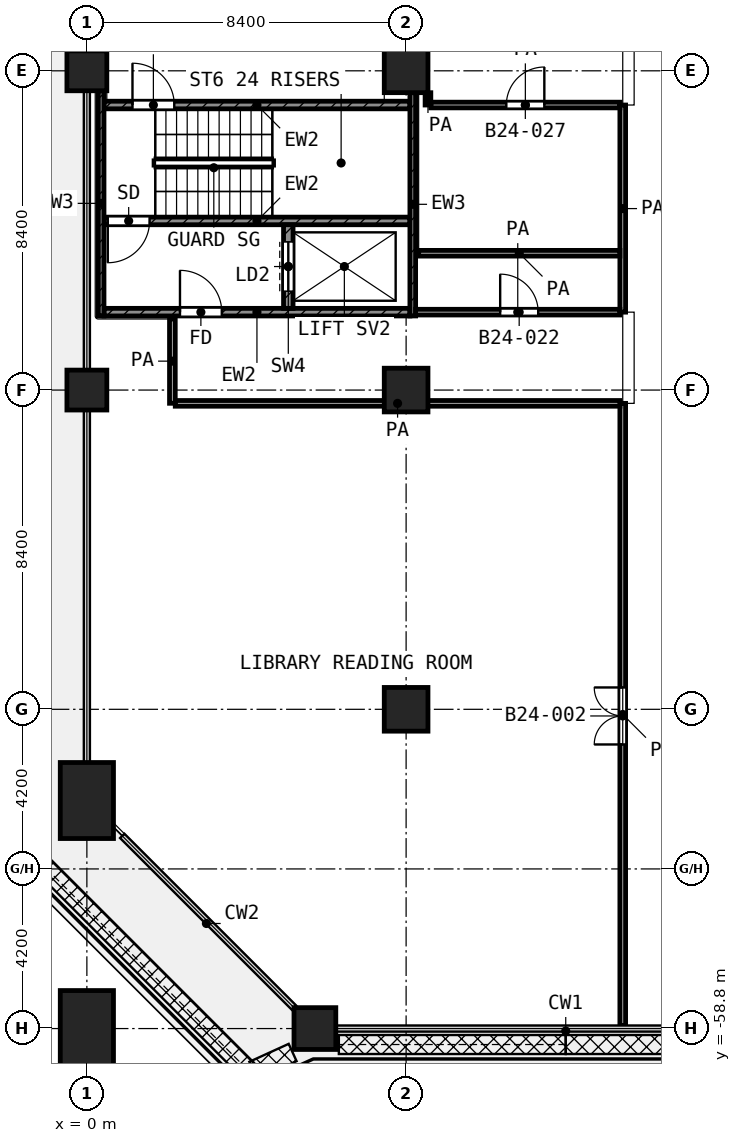
"""IFC4 building model, lengths in metres.
Left out: names, types, materials, properties, quantities, classifications, styles, units other than length and angle.
Written with IfcOpenShell. Run it as: python <this file> out.ifc"""

import sys

from ifc_helpers import new_model, si_unit, direction, frame, frame_2d, origin, origin_2d, place, context, subcontext, project, spatial, rectangle, extrude, element, fill, save


model = new_model("IFC4")
c1 = context("Model", 3, precision=1e-05, world=origin(), true_north=direction((0.0, 1.0)))
c2 = subcontext(c1, "Body", "Model", "MODEL_VIEW")
j1 = project(units=[si_unit("LENGTHUNIT", "METRE"), si_unit("PLANEANGLEUNIT", "RADIAN")], contexts=[c1])
p1 = place(None, origin())
s1 = spatial("IfcSite", under=j1, at=p1, CompositionType="ELEMENT")
p2 = place(p1, origin())
s2 = spatial("IfcBuilding", under=s1, at=p2, CompositionType="ELEMENT")
p3 = place(p2, frame((0.0, 0.0, 107.2)))
s3 = spatial("IfcBuildingStorey", under=s2, at=p3, CompositionType="ELEMENT", Elevation=107.2)
p4 = place(p3, frame((0.0, -33.6, 0.0), z_axis=(0.0, 0.0, 1.0), x_axis=(1.0, 0.0, 0.0)))
e1 = element("IfcColumn", 1, at=p4, inside=s3, PredefinedType="COLUMN", context=c2, shape_type="SweptSolid", body=[
    extrude(rectangle(XDim=1.05, YDim=1.05, at=origin_2d()), origin(), (0.0, 0.0, 1.0), 4.2),
])
p5 = place(p3, frame((8.4, -33.6, 0.0), z_axis=(0.0, 0.0, 1.0), x_axis=(1.0, 0.0, 0.0)))
e2 = element("IfcColumn", 2, at=p5, inside=s3, PredefinedType="COLUMN", context=c2, shape_type="SweptSolid", body=[
    extrude(rectangle(XDim=1.15, YDim=1.15, at=origin_2d()), origin(), (0.0, 0.0, 1.0), 4.2),
])
p6 = place(p3, frame((0.0, -42.0, 0.0), z_axis=(0.0, 0.0, 1.0), x_axis=(1.0, 0.0, 0.0)))
e3 = element("IfcColumn", 3, at=p6, inside=s3, PredefinedType="COLUMN", context=c2, shape_type="SweptSolid", body=[
    extrude(rectangle(XDim=1.05, YDim=1.05, at=origin_2d()), origin(), (0.0, 0.0, 1.0), 4.2),
])
for number, where, z_axis, x_axis in (
    (4, (8.4, -42.0, 0.0), (0.0, 0.0, 1.0), (1.0, 0.0, 0.0)),
    (5, (8.4, -50.4, 0.0), (0.0, 0.0, 1.0), (1.0, 0.0, 0.0)),
):
    element("IfcColumn", number, at=place(p3, frame(where, z_axis=z_axis, x_axis=x_axis)), inside=s3, PredefinedType="COLUMN", context=c2, shape_type="SweptSolid", body=[
        extrude(rectangle(XDim=1.15, YDim=1.15, at=origin_2d()), origin(), (0.0, 0.0, 1.0), 4.2),
    ])
p7 = place(p3, frame((0.0, -52.8, 0.0), z_axis=(0.0, 0.0, 1.0), x_axis=(0.0, 1.0, 0.0)))
e6 = element("IfcColumn", 6, at=p7, inside=s3, PredefinedType="COLUMN", context=c2, shape_type="SweptSolid", body=[
    extrude(rectangle(XDim=2.0, YDim=1.4, at=origin_2d()), origin(), (0.0, 0.0, 1.0), 4.2),
])
p8 = place(p3, frame((6.0, -58.8, 0.0), z_axis=(0.0, 0.0, 1.0), x_axis=(1.0, 0.0, 0.0)))
e7 = element("IfcColumn", 7, at=p8, inside=s3, PredefinedType="COLUMN", context=c2, shape_type="SweptSolid", body=[
    extrude(rectangle(XDim=1.1, YDim=1.1, at=origin_2d()), origin(), (0.0, 0.0, 1.0), 4.2),
])
p9 = place(p3, frame((0.0, -58.8, 0.0), z_axis=(0.0, 0.0, 1.0), x_axis=(0.0, 1.0, 0.0)))
e8 = element("IfcColumn", 8, at=p9, inside=s3, PredefinedType="COLUMN", context=c2, shape_type="SweptSolid", body=[
    extrude(rectangle(XDim=2.0, YDim=1.4, at=origin_2d()), origin(), (0.0, 0.0, 1.0), 4.2),
])
p10 = place(p3, frame((0.375, -40.05, 0.0), z_axis=(0.0, 0.0, 1.0), x_axis=(0.0, 1.0, 0.0)))
e9 = element("IfcWall", 9, at=p10, inside=s3, PredefinedType="SHEAR", context=c2, shape_type="SweptSolid", body=[
    extrude(rectangle(XDim=5.925, YDim=0.15, at=frame_2d((2.962, 0.0))), origin(), (0.0, 0.0, 1.0), 3.6),
])
p11 = place(p3, frame((8.575, -40.05, 0.0), z_axis=(0.0, 0.0, 1.0), x_axis=(0.0, 1.0, 0.0)))
e10 = element("IfcWall", 10, at=p11, inside=s3, PredefinedType="SHEAR", context=c2, shape_type="SweptSolid", body=[
    extrude(rectangle(XDim=5.875, YDim=0.15, at=frame_2d((2.938, 0.0))), origin(), (0.0, 0.0, 1.0), 3.6),
])
p12 = place(p3, frame((0.45, -34.5, 0.0), z_axis=(0.0, 0.0, 1.0), x_axis=(1.0, 0.0, 0.0)))
e11 = element("IfcWall", 11, at=p12, inside=s3, PredefinedType="SHEAR", context=c2, shape_type="SweptSolid", body=[
    extrude(rectangle(XDim=8.05, YDim=0.2, at=frame_2d((4.025, 0.0))), origin(), (0.0, 0.0, 1.0), 3.6),
])
p13 = place(p12, frame((0.75, 0.0, 0.0)))
e12 = element("IfcOpeningElement", 12, at=p13, cuts=e11, PredefinedType="OPENING", context=c2, shape_type="SweptSolid", body=[
    extrude(rectangle(XDim=1.1, YDim=2.1, at=frame_2d((0.55, 1.05))), frame((0.0, 0.11, 0.0), z_axis=(0.0, -1.0, 0.0), x_axis=(1.0, 0.0, 0.0)), (0.0, 0.0, 1.0), 0.22),
])
p14 = place(p3, frame((0.45, -37.55, 0.0), z_axis=(0.0, 0.0, 1.0), x_axis=(1.0, 0.0, 0.0)))
e13 = element("IfcWall", 13, at=p14, inside=s3, PredefinedType="SHEAR", context=c2, shape_type="SweptSolid", body=[
    extrude(rectangle(XDim=8.05, YDim=0.2, at=frame_2d((4.025, 0.0))), origin(), (0.0, 0.0, 1.0), 3.6),
])
p15 = place(p14, frame((0.1, 0.0, 0.0)))
e14 = element("IfcOpeningElement", 14, at=p15, cuts=e13, PredefinedType="OPENING", context=c2, shape_type="SweptSolid", body=[
    extrude(rectangle(XDim=1.1, YDim=2.1, at=frame_2d((0.55, 1.05))), frame((0.0, 0.11, 0.0), z_axis=(0.0, -1.0, 0.0), x_axis=(1.0, 0.0, 0.0)), (0.0, 0.0, 1.0), 0.22),
])
p16 = place(p3, frame((0.45, -39.95, 0.0), z_axis=(0.0, 0.0, 1.0), x_axis=(1.0, 0.0, 0.0)))
e15 = element("IfcWall", 15, at=p16, inside=s3, PredefinedType="SHEAR", context=c2, shape_type="SweptSolid", body=[
    extrude(rectangle(XDim=8.05, YDim=0.2, at=frame_2d((4.025, 0.0))), origin(), (0.0, 0.0, 1.0), 3.6),
])
p17 = place(p16, frame((2.0, 0.0, 0.0)))
e16 = element("IfcOpeningElement", 16, at=p17, cuts=e15, PredefinedType="OPENING", context=c2, shape_type="SweptSolid", body=[
    extrude(rectangle(XDim=1.1, YDim=2.1, at=frame_2d((0.55, 1.05))), frame((0.0, 0.11, 0.0), z_axis=(0.0, -1.0, 0.0), x_axis=(1.0, 0.0, 0.0)), (0.0, 0.0, 1.0), 0.22),
])
p18 = place(p3, frame((5.3, -39.85, 0.0), z_axis=(0.0, 0.0, 1.0), x_axis=(0.0, 1.0, 0.0)))
e17 = element("IfcWall", 17, at=p18, inside=s3, PredefinedType="SHEAR", context=c2, shape_type="SweptSolid", body=[
    extrude(rectangle(XDim=2.2, YDim=0.25, at=frame_2d((1.1, 0.0))), origin(), (0.0, 0.0, 1.0), 3.6),
])
p19 = place(p18, frame((0.45, 0.0, 0.0)))
e18 = element("IfcOpeningElement", 18, at=p19, cuts=e17, PredefinedType="OPENING", context=c2, shape_type="SweptSolid", body=[
    extrude(rectangle(XDim=1.3, YDim=2.1, at=frame_2d((0.65, 1.05))), frame((0.0, 0.135, 0.0), z_axis=(0.0, -1.0, 0.0), x_axis=(1.0, 0.0, 0.0)), (0.0, 0.0, 1.0), 0.27),
])
p20 = place(p3, frame((2.326, -42.35, 0.0), z_axis=(0.0, 0.0, 1.0), x_axis=(1.0, 0.0, 0.0)))
e19 = element("IfcWall", 19, at=p20, inside=s3, PredefinedType="PARTITIONING", context=c2, shape_type="SweptSolid", body=[
    extrude(rectangle(XDim=11.699, YDim=0.15, at=frame_2d((5.85, 0.0))), origin(), (0.0, 0.0, 1.0), 3.6),
])
p21 = place(p3, frame((8.65, -39.95, 0.0), z_axis=(0.0, 0.0, 1.0), x_axis=(1.0, 0.0, 0.0)))
e20 = element("IfcWall", 20, at=p21, inside=s3, PredefinedType="PARTITIONING", context=c2, shape_type="SweptSolid", body=[
    extrude(rectangle(XDim=5.375, YDim=0.15, at=frame_2d((2.688, 0.0))), origin(), (0.0, 0.0, 1.0), 3.6),
])
p22 = place(p21, frame((2.225, 0.0, 0.0)))
e21 = element("IfcOpeningElement", 21, at=p22, cuts=e20, PredefinedType="OPENING", context=c2, shape_type="SweptSolid", body=[
    extrude(rectangle(XDim=1.0, YDim=2.1, at=frame_2d((0.5, 1.05))), frame((0.0, 0.085, 0.0), z_axis=(0.0, -1.0, 0.0), x_axis=(1.0, 0.0, 0.0)), (0.0, 0.0, 1.0), 0.17),
])
p23 = place(p3, frame((8.73, -38.4, 0.0), z_axis=(0.0, 0.0, 1.0), x_axis=(1.0, 0.0, 0.0)))
e22 = element("IfcWall", 22, at=p23, inside=s3, PredefinedType="PARTITIONING", context=c2, shape_type="SweptSolid", body=[
    extrude(rectangle(XDim=5.295, YDim=0.15, at=frame_2d((2.647, 0.0))), origin(), (0.0, 0.0, 1.0), 3.6),
])
p24 = place(p3, frame((9.05, -34.5, 0.0), z_axis=(0.0, 0.0, 1.0), x_axis=(1.0, 0.0, 0.0)))
e23 = element("IfcWall", 23, at=p24, inside=s3, PredefinedType="PARTITIONING", context=c2, shape_type="SweptSolid", body=[
    extrude(rectangle(XDim=4.975, YDim=0.15, at=frame_2d((2.487, 0.0))), origin(), (0.0, 0.0, 1.0), 3.6),
])
p25 = place(p24, frame((1.987, 0.0, 0.0)))
e24 = element("IfcOpeningElement", 24, at=p25, cuts=e23, PredefinedType="OPENING", context=c2, shape_type="SweptSolid", body=[
    extrude(rectangle(XDim=1.0, YDim=2.1, at=frame_2d((0.5, 1.05))), frame((0.0, 0.085, 0.0), z_axis=(0.0, -1.0, 0.0), x_axis=(1.0, 0.0, 0.0)), (0.0, 0.0, 1.0), 0.17),
])
p26 = place(p3, frame((2.25, -42.348, 0.0), z_axis=(0.0, 0.0, 1.0), x_axis=(0.0, 1.0, 0.0)))
e25 = element("IfcWall", 25, at=p26, inside=s3, PredefinedType="PARTITIONING", context=c2, shape_type="SweptSolid", body=[
    extrude(rectangle(XDim=2.218, YDim=0.15, at=frame_2d((1.109, 0.0))), origin(), (0.0, 0.0, 1.0), 3.6),
])
p27 = place(p3, frame((8.975, -34.5, 0.0), z_axis=(0.0, 0.0, 1.0), x_axis=(0.0, 1.0, 0.0)))
e26 = element("IfcWall", 26, at=p27, inside=s3, PredefinedType="PARTITIONING", context=c2, shape_type="SweptSolid", body=[
    extrude(rectangle(XDim=0.324, YDim=0.15, at=frame_2d((0.162, 0.0))), origin(), (0.0, 0.0, 1.0), 3.6),
])
p28 = place(p3, frame((14.1, -58.72, 0.0), z_axis=(0.0, 0.0, 1.0), x_axis=(0.0, 1.0, 0.0)))
e27 = element("IfcWall", 27, at=p28, inside=s3, PredefinedType="PARTITIONING", context=c2, shape_type="SweptSolid", body=[
    extrude(rectangle(XDim=16.37, YDim=0.15, at=frame_2d((8.185, 0.0))), origin(), (0.0, 0.0, 1.0), 2.7),
])
p29 = place(p28, frame((7.395, 0.0, 0.0)))
e28 = element("IfcOpeningElement", 28, at=p29, cuts=e27, PredefinedType="OPENING", context=c2, shape_type="SweptSolid", body=[
    extrude(rectangle(XDim=1.5, YDim=2.1, at=frame_2d((0.75, 1.05))), frame((0.0, 0.085, 0.0), z_axis=(0.0, -1.0, 0.0), x_axis=(1.0, 0.0, 0.0)), (0.0, 0.0, 1.0), 0.17),
])
p30 = place(p3, frame((14.1, -39.95, 0.0), z_axis=(0.0, 0.0, 1.0), x_axis=(0.0, 1.0, 0.0)))
e29 = element("IfcWall", 29, at=p30, inside=s3, PredefinedType="PARTITIONING", context=c2, shape_type="SweptSolid", body=[
    extrude(rectangle(XDim=5.45, YDim=0.15, at=frame_2d((2.725, 0.0))), origin(), (0.0, 0.0, 1.0), 3.6),
])
p31 = place(p13, origin())
e30 = element("IfcDoor", 30, at=p31, inside=s3, OperationType="SINGLE_SWING_LEFT", PredefinedType="DOOR", context=c2, shape_type="SweptSolid", body=[
    extrude(rectangle(XDim=1.1, YDim=2.1, at=frame_2d((0.55, 1.05))), frame((0.0, 0.025, 0.0), z_axis=(0.0, -1.0, 0.0), x_axis=(1.0, 0.0, 0.0)), (0.0, 0.0, 1.0), 0.05),
])
fill(e12, e30)
p32 = place(p15, frame((1.1, 0.0, 0.0), z_axis=(0.0, 0.0, 1.0), x_axis=(-1.0, 0.0, 0.0)))
e31 = element("IfcDoor", 31, at=p32, inside=s3, OperationType="SINGLE_SWING_LEFT", PredefinedType="DOOR", context=c2, shape_type="SweptSolid", body=[
    extrude(rectangle(XDim=1.1, YDim=2.1, at=frame_2d((0.55, 1.05))), frame((0.0, 0.025, 0.0), z_axis=(0.0, -1.0, 0.0), x_axis=(1.0, 0.0, 0.0)), (0.0, 0.0, 1.0), 0.05),
])
fill(e14, e31)
p33 = place(p19, origin())
e32 = element("IfcDoor", 32, at=p33, inside=s3, OperationType="DOUBLE_DOOR_SLIDING", PredefinedType="DOOR", context=c2, shape_type="SweptSolid", body=[
    extrude(rectangle(XDim=1.3, YDim=2.1, at=frame_2d((0.65, 1.05))), frame((0.0, 0.025, 0.0), z_axis=(0.0, -1.0, 0.0), x_axis=(1.0, 0.0, 0.0)), (0.0, 0.0, 1.0), 0.05),
])
fill(e18, e32)
p34 = place(p17, origin())
e33 = element("IfcDoor", 33, at=p34, inside=s3, OperationType="SINGLE_SWING_LEFT", PredefinedType="DOOR", context=c2, shape_type="SweptSolid", body=[
    extrude(rectangle(XDim=1.1, YDim=2.1, at=frame_2d((0.55, 1.05))), frame((0.0, 0.025, 0.0), z_axis=(0.0, -1.0, 0.0), x_axis=(1.0, 0.0, 0.0)), (0.0, 0.0, 1.0), 0.05),
])
fill(e16, e33)
p35 = place(p22, origin())
e34 = element("IfcDoor", 34, at=p35, inside=s3, OperationType="SINGLE_SWING_LEFT", PredefinedType="DOOR", context=c2, shape_type="SweptSolid", body=[
    extrude(rectangle(XDim=1.0, YDim=2.1, at=frame_2d((0.5, 1.05))), frame((0.0, 0.025, 0.0), z_axis=(0.0, -1.0, 0.0), x_axis=(1.0, 0.0, 0.0)), (0.0, 0.0, 1.0), 0.05),
])
fill(e21, e34)
p36 = place(p29, origin())
e35 = element("IfcDoor", 35, at=p36, inside=s3, OperationType="DOUBLE_DOOR_SINGLE_SWING", PredefinedType="DOOR", context=c2, shape_type="SweptSolid", body=[
    extrude(rectangle(XDim=1.5, YDim=2.1, at=frame_2d((0.75, 1.05))), frame((0.0, 0.025, 0.0), z_axis=(0.0, -1.0, 0.0), x_axis=(1.0, 0.0, 0.0)), (0.0, 0.0, 1.0), 0.05),
])
fill(e28, e35)
p37 = place(p25, origin())
e36 = element("IfcDoor", 36, at=p37, inside=s3, OperationType="SINGLE_SWING_RIGHT", PredefinedType="DOOR", context=c2, shape_type="SweptSolid", body=[
    extrude(rectangle(XDim=1.0, YDim=2.1, at=frame_2d((0.5, 1.05))), frame((0.0, 0.025, 0.0), z_axis=(0.0, -1.0, 0.0), x_axis=(1.0, 0.0, 0.0)), (0.0, 0.0, 1.0), 0.05),
])
fill(e24, e36)
save(model, sys.argv[1])
